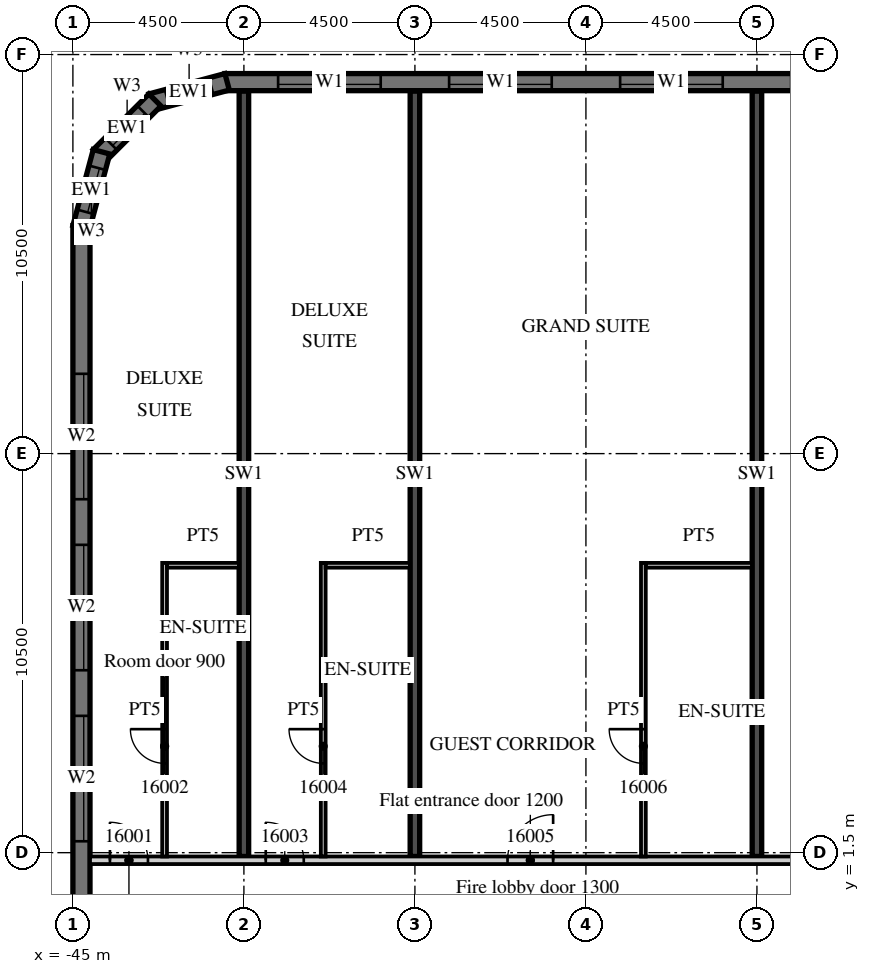
"""IFC4 building model, lengths in metres.
Left out: names, types, materials, properties, quantities, classifications, styles, units other than length and angle.
Written with IfcOpenShell. Run it as: python <this file> out.ifc"""

import sys

from ifc_helpers import new_model, si_unit, direction, frame, frame_2d, origin, place, context, subcontext, project, spatial, polyline, rectangle, outline, extrude, element, fill, save


model = new_model("IFC4")
c1 = context("Model", 3, precision=1e-05, world=origin(), true_north=direction((0.0, 1.0)))
c2 = subcontext(c1, "Body", "Model", "MODEL_VIEW")
j1 = project(units=[si_unit("LENGTHUNIT", "METRE"), si_unit("PLANEANGLEUNIT", "RADIAN")], contexts=[c1])
p1 = place(None, origin())
s1 = spatial("IfcSite", under=j1, at=p1, CompositionType="ELEMENT")
p2 = place(p1, origin())
s2 = spatial("IfcBuilding", under=s1, at=p2, CompositionType="ELEMENT")
p3 = place(p2, frame((0.0, 0.0, 83.1)))
s3 = spatial("IfcBuildingStorey", under=s2, at=p3, CompositionType="ELEMENT", Elevation=83.1)
for number, where, z_axis, x_axis in (
    (1, (-40.5, 1.4, 0.0), (0.0, 0.0, 1.0), (0.0, 1.0, 0.0)),
    (2, (-36.0, 1.4, 0.0), (0.0, 0.0, 1.0), (0.0, 1.0, 0.0)),
    (3, (-27.0, 1.4, 0.0), (0.0, 0.0, 1.0), (0.0, 1.0, 0.0)),
):
    element("IfcWall", number, at=place(p3, frame(where, z_axis=z_axis, x_axis=x_axis)), inside=s3, PredefinedType="SHEAR", context=c2, shape_type="SweptSolid", body=[
        extrude(rectangle(XDim=20.14, YDim=0.25, at=frame_2d((10.07, 0.0))), origin(), (0.0, 0.0, 1.0), 3.3),
    ])
p4 = place(p3, frame((13.5, 21.775, 0.0), z_axis=(0.0, 0.0, 1.0), x_axis=(-1.0, 0.0, 0.0)))
e4 = element("IfcWall", 4, at=p4, inside=s3, PredefinedType="SOLIDWALL", context=c2, shape_type="SweptSolid", body=[
    extrude(rectangle(XDim=54.5, YDim=0.45, at=frame_2d((27.25, 0.0))), origin(), (0.0, 0.0, 1.0), 3.02),
])
p5 = place(p4, frame((0.9, 0.0, 0.45)))
e5 = element("IfcOpeningElement", 5, at=p5, cuts=e4, PredefinedType="OPENING", context=c2, shape_type="SweptSolid", body=[
    extrude(rectangle(XDim=2.7, YDim=2.25, at=frame_2d((1.35, 1.125))), frame((0.0, 0.235, 0.0), z_axis=(0.0, -1.0, 0.0), x_axis=(1.0, 0.0, 0.0)), (0.0, 0.0, 1.0), 0.47),
])
p6 = place(p4, frame((5.4, 0.0, 0.45)))
e6 = element("IfcOpeningElement", 6, at=p6, cuts=e4, PredefinedType="OPENING", context=c2, shape_type="SweptSolid", body=[
    extrude(rectangle(XDim=2.7, YDim=2.25, at=frame_2d((1.35, 1.125))), frame((0.0, 0.235, 0.0), z_axis=(0.0, -1.0, 0.0), x_axis=(1.0, 0.0, 0.0)), (0.0, 0.0, 1.0), 0.47),
])
p7 = place(p4, frame((9.9, 0.0, 0.45)))
e7 = element("IfcOpeningElement", 7, at=p7, cuts=e4, PredefinedType="OPENING", context=c2, shape_type="SweptSolid", body=[
    extrude(rectangle(XDim=2.7, YDim=2.25, at=frame_2d((1.35, 1.125))), frame((0.0, 0.235, 0.0), z_axis=(0.0, -1.0, 0.0), x_axis=(1.0, 0.0, 0.0)), (0.0, 0.0, 1.0), 0.47),
])
p8 = place(p4, frame((14.4, 0.0, 0.45)))
e8 = element("IfcOpeningElement", 8, at=p8, cuts=e4, PredefinedType="OPENING", context=c2, shape_type="SweptSolid", body=[
    extrude(rectangle(XDim=2.7, YDim=2.25, at=frame_2d((1.35, 1.125))), frame((0.0, 0.235, 0.0), z_axis=(0.0, -1.0, 0.0), x_axis=(1.0, 0.0, 0.0)), (0.0, 0.0, 1.0), 0.47),
])
p9 = place(p4, frame((18.9, 0.0, 0.45)))
e9 = element("IfcOpeningElement", 9, at=p9, cuts=e4, PredefinedType="OPENING", context=c2, shape_type="SweptSolid", body=[
    extrude(rectangle(XDim=2.7, YDim=2.25, at=frame_2d((1.35, 1.125))), frame((0.0, 0.235, 0.0), z_axis=(0.0, -1.0, 0.0), x_axis=(1.0, 0.0, 0.0)), (0.0, 0.0, 1.0), 0.47),
])
p10 = place(p4, frame((23.4, 0.0, 0.45)))
e10 = element("IfcOpeningElement", 10, at=p10, cuts=e4, PredefinedType="OPENING", context=c2, shape_type="SweptSolid", body=[
    extrude(rectangle(XDim=2.7, YDim=2.25, at=frame_2d((1.35, 1.125))), frame((0.0, 0.235, 0.0), z_axis=(0.0, -1.0, 0.0), x_axis=(1.0, 0.0, 0.0)), (0.0, 0.0, 1.0), 0.47),
])
p11 = place(p4, frame((27.9, 0.0, 0.45)))
e11 = element("IfcOpeningElement", 11, at=p11, cuts=e4, PredefinedType="OPENING", context=c2, shape_type="SweptSolid", body=[
    extrude(rectangle(XDim=2.7, YDim=2.25, at=frame_2d((1.35, 1.125))), frame((0.0, 0.235, 0.0), z_axis=(0.0, -1.0, 0.0), x_axis=(1.0, 0.0, 0.0)), (0.0, 0.0, 1.0), 0.47),
])
p12 = place(p4, frame((32.4, 0.0, 0.45)))
e12 = element("IfcOpeningElement", 12, at=p12, cuts=e4, PredefinedType="OPENING", context=c2, shape_type="SweptSolid", body=[
    extrude(rectangle(XDim=2.7, YDim=2.25, at=frame_2d((1.35, 1.125))), frame((0.0, 0.235, 0.0), z_axis=(0.0, -1.0, 0.0), x_axis=(1.0, 0.0, 0.0)), (0.0, 0.0, 1.0), 0.47),
])
p13 = place(p4, frame((36.9, 0.0, 0.45)))
e13 = element("IfcOpeningElement", 13, at=p13, cuts=e4, PredefinedType="OPENING", context=c2, shape_type="SweptSolid", body=[
    extrude(rectangle(XDim=2.7, YDim=2.25, at=frame_2d((1.35, 1.125))), frame((0.0, 0.235, 0.0), z_axis=(0.0, -1.0, 0.0), x_axis=(1.0, 0.0, 0.0)), (0.0, 0.0, 1.0), 0.47),
])
p14 = place(p4, frame((41.4, 0.0, 0.45)))
e14 = element("IfcOpeningElement", 14, at=p14, cuts=e4, PredefinedType="OPENING", context=c2, shape_type="SweptSolid", body=[
    extrude(rectangle(XDim=2.7, YDim=2.25, at=frame_2d((1.35, 1.125))), frame((0.0, 0.235, 0.0), z_axis=(0.0, -1.0, 0.0), x_axis=(1.0, 0.0, 0.0)), (0.0, 0.0, 1.0), 0.47),
])
p15 = place(p4, frame((45.9, 0.0, 0.45)))
e15 = element("IfcOpeningElement", 15, at=p15, cuts=e4, PredefinedType="OPENING", context=c2, shape_type="SweptSolid", body=[
    extrude(rectangle(XDim=2.7, YDim=2.25, at=frame_2d((1.35, 1.125))), frame((0.0, 0.235, 0.0), z_axis=(0.0, -1.0, 0.0), x_axis=(1.0, 0.0, 0.0)), (0.0, 0.0, 1.0), 0.47),
])
p16 = place(p4, frame((50.4, 0.0, 0.45)))
e16 = element("IfcOpeningElement", 16, at=p16, cuts=e4, PredefinedType="OPENING", context=c2, shape_type="SweptSolid", body=[
    extrude(rectangle(XDim=2.7, YDim=2.25, at=frame_2d((1.35, 1.125))), frame((0.0, 0.235, 0.0), z_axis=(0.0, -1.0, 0.0), x_axis=(1.0, 0.0, 0.0)), (0.0, 0.0, 1.0), 0.47),
])
p17 = place(p3, frame((-40.942, 21.783, 0.0), z_axis=(0.0, 0.0, 1.0), x_axis=(-0.965926999034, -0.25881466832, 0.0)))
e17 = element("IfcWall", 17, at=p17, inside=s3, PredefinedType="SOLIDWALL", context=c2, shape_type="SweptSolid", body=[
    extrude(outline(polyline([(0.0, -0.225), (2.071, -0.225), (1.95, 0.225), (0.121, 0.225), (0.0, -0.225)])), origin(), (0.0, 0.0, 1.0), 3.02),
])
p18 = place(p17, frame((0.435, 0.0, 0.45)))
e18 = element("IfcOpeningElement", 18, at=p18, cuts=e17, PredefinedType="OPENING", context=c2, shape_type="SweptSolid", body=[
    extrude(rectangle(XDim=1.2, YDim=2.25, at=frame_2d((0.6, 1.125))), frame((0.0, 0.235, 0.0), z_axis=(0.0, -1.0, 0.0), x_axis=(1.0, 0.0, 0.0)), (0.0, 0.0, 1.0), 0.47),
])
p19 = place(p3, frame((-42.841, 21.305, 0.0), z_axis=(0.0, 0.0, 1.0), x_axis=(-0.707106781187, -0.707106781187, 0.0)))
e19 = element("IfcWall", 19, at=p19, inside=s3, PredefinedType="SOLIDWALL", context=c2, shape_type="SweptSolid", body=[
    extrude(outline(polyline([(0.0, -0.225), (2.071, -0.225), (1.95, 0.225), (0.121, 0.225), (0.0, -0.225)])), origin(), (0.0, 0.0, 1.0), 3.02),
])
p20 = place(p19, frame((0.435, 0.0, 0.45)))
e20 = element("IfcOpeningElement", 20, at=p20, cuts=e19, PredefinedType="OPENING", context=c2, shape_type="SweptSolid", body=[
    extrude(rectangle(XDim=1.2, YDim=2.25, at=frame_2d((0.6, 1.125))), frame((0.0, 0.235, 0.0), z_axis=(0.0, -1.0, 0.0), x_axis=(1.0, 0.0, 0.0)), (0.0, 0.0, 1.0), 0.47),
])
p21 = place(p3, frame((-44.247, 19.942, 0.0), z_axis=(0.0, 0.0, 1.0), x_axis=(-0.25881466832, -0.965926999034, 0.0)))
e21 = element("IfcWall", 21, at=p21, inside=s3, PredefinedType="SOLIDWALL", context=c2, shape_type="SweptSolid", body=[
    extrude(outline(polyline([(-0.0, -0.225), (2.07, -0.225), (1.95, 0.225), (0.12, 0.225), (-0.0, -0.225)])), origin(), (0.0, 0.0, 1.0), 3.02),
])
p22 = place(p21, frame((0.435, 0.0, 0.45)))
e22 = element("IfcOpeningElement", 22, at=p22, cuts=e21, PredefinedType="OPENING", context=c2, shape_type="SweptSolid", body=[
    extrude(rectangle(XDim=1.2, YDim=2.25, at=frame_2d((0.6, 1.125))), frame((0.0, 0.235, 0.0), z_axis=(0.0, -1.0, 0.0), x_axis=(1.0, 0.0, 0.0)), (0.0, 0.0, 1.0), 0.47),
])
p23 = place(p3, frame((-44.775, 18.0, 0.0), z_axis=(0.0, 0.0, 1.0), x_axis=(0.0, -1.0, 0.0)))
e23 = element("IfcWall", 23, at=p23, inside=s3, PredefinedType="SOLIDWALL", context=c2, shape_type="SweptSolid", body=[
    extrude(rectangle(XDim=36.0, YDim=0.45, at=frame_2d((18.0, 0.0))), origin(), (0.0, 0.0, 1.0), 3.02),
])
p24 = place(p23, frame((3.9, 0.0, 0.45)))
e24 = element("IfcOpeningElement", 24, at=p24, cuts=e23, PredefinedType="OPENING", context=c2, shape_type="SweptSolid", body=[
    extrude(rectangle(XDim=3.3, YDim=2.25, at=frame_2d((1.65, 1.125))), frame((0.0, 0.235, 0.0), z_axis=(0.0, -1.0, 0.0), x_axis=(1.0, 0.0, 0.0)), (0.0, 0.0, 1.0), 0.47),
])
p25 = place(p23, frame((8.4, 0.0, 0.45)))
e25 = element("IfcOpeningElement", 25, at=p25, cuts=e23, PredefinedType="OPENING", context=c2, shape_type="SweptSolid", body=[
    extrude(rectangle(XDim=3.3, YDim=2.25, at=frame_2d((1.65, 1.125))), frame((0.0, 0.235, 0.0), z_axis=(0.0, -1.0, 0.0), x_axis=(1.0, 0.0, 0.0)), (0.0, 0.0, 1.0), 0.47),
])
p26 = place(p23, frame((12.9, 0.0, 0.45)))
e26 = element("IfcOpeningElement", 26, at=p26, cuts=e23, PredefinedType="OPENING", context=c2, shape_type="SweptSolid", body=[
    extrude(rectangle(XDim=3.3, YDim=2.25, at=frame_2d((1.65, 1.125))), frame((0.0, 0.235, 0.0), z_axis=(0.0, -1.0, 0.0), x_axis=(1.0, 0.0, 0.0)), (0.0, 0.0, 1.0), 0.47),
])
p27 = place(p3, frame((-44.55, 1.3, 0.0), z_axis=(0.0, 0.0, 1.0), x_axis=(1.0, 0.0, 0.0)))
e27 = element("IfcWall", 27, at=p27, inside=s3, PredefinedType="PARTITIONING", context=c2, shape_type="SweptSolid", body=[
    extrude(rectangle(XDim=58.05, YDim=0.2, at=frame_2d((29.025, 0.0))), origin(), (0.0, 0.0, 1.0), 3.02),
])
p28 = place(p27, frame((0.525, 0.0, 0.0)))
e28 = element("IfcOpeningElement", 28, at=p28, cuts=e27, PredefinedType="OPENING", context=c2, shape_type="SweptSolid", body=[
    extrude(rectangle(XDim=1.0, YDim=2.1, at=frame_2d((0.5, 1.05))), frame((0.0, 0.11, 0.0), z_axis=(0.0, -1.0, 0.0), x_axis=(1.0, 0.0, 0.0)), (0.0, 0.0, 1.0), 0.22),
])
p29 = place(p27, frame((4.625, 0.0, 0.0)))
e29 = element("IfcOpeningElement", 29, at=p29, cuts=e27, PredefinedType="OPENING", context=c2, shape_type="SweptSolid", body=[
    extrude(rectangle(XDim=1.0, YDim=2.1, at=frame_2d((0.5, 1.05))), frame((0.0, 0.11, 0.0), z_axis=(0.0, -1.0, 0.0), x_axis=(1.0, 0.0, 0.0)), (0.0, 0.0, 1.0), 0.22),
])
p30 = place(p27, frame((10.987, 0.0, 0.0)))
e30 = element("IfcOpeningElement", 30, at=p30, cuts=e27, PredefinedType="OPENING", context=c2, shape_type="SweptSolid", body=[
    extrude(rectangle(XDim=1.2, YDim=2.1, at=frame_2d((0.6, 1.05))), frame((0.0, 0.11, 0.0), z_axis=(0.0, -1.0, 0.0), x_axis=(1.0, 0.0, 0.0)), (0.0, 0.0, 1.0), 0.22),
])
p31 = place(p27, frame((19.987, 0.0, 0.0)))
e31 = element("IfcOpeningElement", 31, at=p31, cuts=e27, PredefinedType="OPENING", context=c2, shape_type="SweptSolid", body=[
    extrude(rectangle(XDim=1.2, YDim=2.1, at=frame_2d((0.6, 1.05))), frame((0.0, 0.11, 0.0), z_axis=(0.0, -1.0, 0.0), x_axis=(1.0, 0.0, 0.0)), (0.0, 0.0, 1.0), 0.22),
])
p32 = place(p27, frame((28.987, 0.0, 0.0)))
e32 = element("IfcOpeningElement", 32, at=p32, cuts=e27, PredefinedType="OPENING", context=c2, shape_type="SweptSolid", body=[
    extrude(rectangle(XDim=1.2, YDim=2.1, at=frame_2d((0.6, 1.05))), frame((0.0, 0.11, 0.0), z_axis=(0.0, -1.0, 0.0), x_axis=(1.0, 0.0, 0.0)), (0.0, 0.0, 1.0), 0.22),
])
p33 = place(p27, frame((36.125, 0.0, 0.0)))
e33 = element("IfcOpeningElement", 33, at=p33, cuts=e27, PredefinedType="OPENING", context=c2, shape_type="SweptSolid", body=[
    extrude(rectangle(XDim=1.0, YDim=2.1, at=frame_2d((0.5, 1.05))), frame((0.0, 0.11, 0.0), z_axis=(0.0, -1.0, 0.0), x_axis=(1.0, 0.0, 0.0)), (0.0, 0.0, 1.0), 0.22),
])
p34 = place(p27, frame((42.975, 0.0, 0.0)))
e34 = element("IfcOpeningElement", 34, at=p34, cuts=e27, PredefinedType="OPENING", context=c2, shape_type="SweptSolid", body=[
    extrude(rectangle(XDim=1.0, YDim=2.1, at=frame_2d((0.5, 1.05))), frame((0.0, 0.11, 0.0), z_axis=(0.0, -1.0, 0.0), x_axis=(1.0, 0.0, 0.0)), (0.0, 0.0, 1.0), 0.22),
])
p35 = place(p27, frame((46.987, 0.0, 0.0)))
e35 = element("IfcOpeningElement", 35, at=p35, cuts=e27, PredefinedType="OPENING", context=c2, shape_type="SweptSolid", body=[
    extrude(rectangle(XDim=1.2, YDim=2.1, at=frame_2d((0.6, 1.05))), frame((0.0, 0.11, 0.0), z_axis=(0.0, -1.0, 0.0), x_axis=(1.0, 0.0, 0.0)), (0.0, 0.0, 1.0), 0.22),
])
p36 = place(p27, frame((56.475, 0.0, 0.0)))
e36 = element("IfcOpeningElement", 36, at=p36, cuts=e27, PredefinedType="OPENING", context=c2, shape_type="SweptSolid", body=[
    extrude(rectangle(XDim=1.0, YDim=2.1, at=frame_2d((0.5, 1.05))), frame((0.0, 0.11, 0.0), z_axis=(0.0, -1.0, 0.0), x_axis=(1.0, 0.0, 0.0)), (0.0, 0.0, 1.0), 0.22),
])
p37 = place(p3, frame((-42.587, 1.4, 0.0), z_axis=(0.0, 0.0, 1.0), x_axis=(0.0, 1.0, 0.0)))
e37 = element("IfcWall", 37, at=p37, inside=s3, PredefinedType="PARTITIONING", context=c2, shape_type="SweptSolid", body=[
    extrude(rectangle(XDim=7.725, YDim=0.125, at=frame_2d((3.863, 0.0))), origin(), (0.0, 0.0, 1.0), 3.02),
])
p38 = place(p37, frame((2.45, 0.0, 0.0)))
e38 = element("IfcOpeningElement", 38, at=p38, cuts=e37, PredefinedType="OPENING", context=c2, shape_type="SweptSolid", body=[
    extrude(rectangle(XDim=0.9, YDim=2.1, at=frame_2d((0.45, 1.05))), frame((0.0, 0.073, 0.0), z_axis=(0.0, -1.0, 0.0), x_axis=(1.0, 0.0, 0.0)), (0.0, 0.0, 1.0), 0.145),
])
p39 = place(p3, frame((-42.525, 9.062, 0.0), z_axis=(0.0, 0.0, 1.0), x_axis=(1.0, 0.0, 0.0)))
e39 = element("IfcWall", 39, at=p39, inside=s3, PredefinedType="PARTITIONING", context=c2, shape_type="SweptSolid", body=[
    extrude(rectangle(XDim=1.9, YDim=0.125, at=frame_2d((0.95, 0.0))), origin(), (0.0, 0.0, 1.0), 3.02),
])
p40 = place(p3, frame((-38.413, 1.4, 0.0), z_axis=(0.0, 0.0, 1.0), x_axis=(0.0, 1.0, 0.0)))
e40 = element("IfcWall", 40, at=p40, inside=s3, PredefinedType="PARTITIONING", context=c2, shape_type="SweptSolid", body=[
    extrude(rectangle(XDim=7.725, YDim=0.125, at=frame_2d((3.863, 0.0))), origin(), (0.0, 0.0, 1.0), 3.02),
])
p41 = place(p40, frame((2.45, 0.0, 0.0)))
e41 = element("IfcOpeningElement", 41, at=p41, cuts=e40, PredefinedType="OPENING", context=c2, shape_type="SweptSolid", body=[
    extrude(rectangle(XDim=0.9, YDim=2.1, at=frame_2d((0.45, 1.05))), frame((0.0, 0.073, 0.0), z_axis=(0.0, -1.0, 0.0), x_axis=(1.0, 0.0, 0.0)), (0.0, 0.0, 1.0), 0.145),
])
p42 = place(p3, frame((-38.35, 9.062, 0.0), z_axis=(0.0, 0.0, 1.0), x_axis=(1.0, 0.0, 0.0)))
e42 = element("IfcWall", 42, at=p42, inside=s3, PredefinedType="PARTITIONING", context=c2, shape_type="SweptSolid", body=[
    extrude(rectangle(XDim=2.225, YDim=0.125, at=frame_2d((1.113, 0.0))), origin(), (0.0, 0.0, 1.0), 3.02),
])
p43 = place(p3, frame((-29.988, 1.4, 0.0), z_axis=(0.0, 0.0, 1.0), x_axis=(0.0, 1.0, 0.0)))
e43 = element("IfcWall", 43, at=p43, inside=s3, PredefinedType="PARTITIONING", context=c2, shape_type="SweptSolid", body=[
    extrude(rectangle(XDim=7.725, YDim=0.125, at=frame_2d((3.863, 0.0))), origin(), (0.0, 0.0, 1.0), 3.02),
])
p44 = place(p43, frame((2.45, 0.0, 0.0)))
e44 = element("IfcOpeningElement", 44, at=p44, cuts=e43, PredefinedType="OPENING", context=c2, shape_type="SweptSolid", body=[
    extrude(rectangle(XDim=0.9, YDim=2.1, at=frame_2d((0.45, 1.05))), frame((0.0, 0.073, 0.0), z_axis=(0.0, -1.0, 0.0), x_axis=(1.0, 0.0, 0.0)), (0.0, 0.0, 1.0), 0.145),
])
p45 = place(p3, frame((-29.925, 9.062, 0.0), z_axis=(0.0, 0.0, 1.0), x_axis=(1.0, 0.0, 0.0)))
e45 = element("IfcWall", 45, at=p45, inside=s3, PredefinedType="PARTITIONING", context=c2, shape_type="SweptSolid", body=[
    extrude(rectangle(XDim=2.8, YDim=0.125, at=frame_2d((1.4, 0.0))), origin(), (0.0, 0.0, 1.0), 3.02),
])
p46 = place(p14, origin())
e46 = element("IfcWindow", 46, at=p46, inside=s3, PartitioningType="SINGLE_PANEL", PredefinedType="WINDOW", context=c2, shape_type="SweptSolid", body=[
    extrude(rectangle(XDim=2.7, YDim=2.25, at=frame_2d((1.35, 1.125))), frame((0.0, 0.09, 0.0), z_axis=(0.0, -1.0, 0.0), x_axis=(1.0, 0.0, 0.0)), (0.0, 0.0, 1.0), 0.06),
])
fill(e14, e46)
p47 = place(p15, origin())
e47 = element("IfcWindow", 47, at=p47, inside=s3, PartitioningType="SINGLE_PANEL", PredefinedType="WINDOW", context=c2, shape_type="SweptSolid", body=[
    extrude(rectangle(XDim=2.7, YDim=2.25, at=frame_2d((1.35, 1.125))), frame((0.0, 0.09, 0.0), z_axis=(0.0, -1.0, 0.0), x_axis=(1.0, 0.0, 0.0)), (0.0, 0.0, 1.0), 0.06),
])
fill(e15, e47)
p48 = place(p16, origin())
e48 = element("IfcWindow", 48, at=p48, inside=s3, PartitioningType="SINGLE_PANEL", PredefinedType="WINDOW", context=c2, shape_type="SweptSolid", body=[
    extrude(rectangle(XDim=2.7, YDim=2.25, at=frame_2d((1.35, 1.125))), frame((0.0, 0.09, 0.0), z_axis=(0.0, -1.0, 0.0), x_axis=(1.0, 0.0, 0.0)), (0.0, 0.0, 1.0), 0.06),
])
fill(e16, e48)
p49 = place(p18, origin())
e49 = element("IfcWindow", 49, at=p49, inside=s3, PartitioningType="SINGLE_PANEL", PredefinedType="WINDOW", context=c2, shape_type="SweptSolid", body=[
    extrude(rectangle(XDim=1.2, YDim=2.25, at=frame_2d((0.6, 1.125))), frame((0.0, 0.09, 0.0), z_axis=(0.0, -1.0, 0.0), x_axis=(1.0, 0.0, 0.0)), (0.0, 0.0, 1.0), 0.06),
])
fill(e18, e49)
p50 = place(p20, origin())
e50 = element("IfcWindow", 50, at=p50, inside=s3, PartitioningType="SINGLE_PANEL", PredefinedType="WINDOW", context=c2, shape_type="SweptSolid", body=[
    extrude(rectangle(XDim=1.2, YDim=2.25, at=frame_2d((0.6, 1.125))), frame((0.0, 0.09, 0.0), z_axis=(0.0, -1.0, 0.0), x_axis=(1.0, 0.0, 0.0)), (0.0, 0.0, 1.0), 0.06),
])
fill(e20, e50)
p51 = place(p22, origin())
e51 = element("IfcWindow", 51, at=p51, inside=s3, PartitioningType="SINGLE_PANEL", PredefinedType="WINDOW", context=c2, shape_type="SweptSolid", body=[
    extrude(rectangle(XDim=1.2, YDim=2.25, at=frame_2d((0.6, 1.125))), frame((0.0, 0.09, 0.0), z_axis=(0.0, -1.0, 0.0), x_axis=(1.0, 0.0, 0.0)), (0.0, 0.0, 1.0), 0.06),
])
fill(e22, e51)
p52 = place(p24, origin())
e52 = element("IfcWindow", 52, at=p52, inside=s3, PartitioningType="SINGLE_PANEL", PredefinedType="WINDOW", context=c2, shape_type="SweptSolid", body=[
    extrude(rectangle(XDim=3.3, YDim=2.25, at=frame_2d((1.65, 1.125))), frame((0.0, 0.09, 0.0), z_axis=(0.0, -1.0, 0.0), x_axis=(1.0, 0.0, 0.0)), (0.0, 0.0, 1.0), 0.06),
])
fill(e24, e52)
p53 = place(p25, origin())
e53 = element("IfcWindow", 53, at=p53, inside=s3, PartitioningType="SINGLE_PANEL", PredefinedType="WINDOW", context=c2, shape_type="SweptSolid", body=[
    extrude(rectangle(XDim=3.3, YDim=2.25, at=frame_2d((1.65, 1.125))), frame((0.0, 0.09, 0.0), z_axis=(0.0, -1.0, 0.0), x_axis=(1.0, 0.0, 0.0)), (0.0, 0.0, 1.0), 0.06),
])
fill(e25, e53)
p54 = place(p26, origin())
e54 = element("IfcWindow", 54, at=p54, inside=s3, PartitioningType="SINGLE_PANEL", PredefinedType="WINDOW", context=c2, shape_type="SweptSolid", body=[
    extrude(rectangle(XDim=3.3, YDim=2.25, at=frame_2d((1.65, 1.125))), frame((0.0, 0.09, 0.0), z_axis=(0.0, -1.0, 0.0), x_axis=(1.0, 0.0, 0.0)), (0.0, 0.0, 1.0), 0.06),
])
fill(e26, e54)
p55 = place(p28, origin())
e55 = element("IfcDoor", 55, at=p55, inside=s3, OperationType="SINGLE_SWING_LEFT", PredefinedType="DOOR", context=c2, shape_type="SweptSolid", body=[
    extrude(rectangle(XDim=1.0, YDim=2.1, at=frame_2d((0.5, 1.05))), frame((0.0, 0.025, 0.0), z_axis=(0.0, -1.0, 0.0), x_axis=(1.0, 0.0, 0.0)), (0.0, 0.0, 1.0), 0.05),
])
fill(e28, e55)
p56 = place(p38, origin())
e56 = element("IfcDoor", 56, at=p56, inside=s3, OperationType="SINGLE_SWING_RIGHT", PredefinedType="DOOR", context=c2, shape_type="SweptSolid", body=[
    extrude(rectangle(XDim=0.9, YDim=2.1, at=frame_2d((0.45, 1.05))), frame((0.0, 0.025, 0.0), z_axis=(0.0, -1.0, 0.0), x_axis=(1.0, 0.0, 0.0)), (0.0, 0.0, 1.0), 0.05),
])
fill(e38, e56)
p57 = place(p29, origin())
e57 = element("IfcDoor", 57, at=p57, inside=s3, OperationType="SINGLE_SWING_LEFT", PredefinedType="DOOR", context=c2, shape_type="SweptSolid", body=[
    extrude(rectangle(XDim=1.0, YDim=2.1, at=frame_2d((0.5, 1.05))), frame((0.0, 0.025, 0.0), z_axis=(0.0, -1.0, 0.0), x_axis=(1.0, 0.0, 0.0)), (0.0, 0.0, 1.0), 0.05),
])
fill(e29, e57)
p58 = place(p41, origin())
e58 = element("IfcDoor", 58, at=p58, inside=s3, OperationType="SINGLE_SWING_RIGHT", PredefinedType="DOOR", context=c2, shape_type="SweptSolid", body=[
    extrude(rectangle(XDim=0.9, YDim=2.1, at=frame_2d((0.45, 1.05))), frame((0.0, 0.025, 0.0), z_axis=(0.0, -1.0, 0.0), x_axis=(1.0, 0.0, 0.0)), (0.0, 0.0, 1.0), 0.05),
])
fill(e41, e58)
p59 = place(p30, origin())
e59 = element("IfcDoor", 59, at=p59, inside=s3, OperationType="SINGLE_SWING_RIGHT", PredefinedType="DOOR", context=c2, shape_type="SweptSolid", body=[
    extrude(rectangle(XDim=1.2, YDim=2.1, at=frame_2d((0.6, 1.05))), frame((0.0, 0.025, 0.0), z_axis=(0.0, -1.0, 0.0), x_axis=(1.0, 0.0, 0.0)), (0.0, 0.0, 1.0), 0.05),
])
fill(e30, e59)
p60 = place(p44, origin())
e60 = element("IfcDoor", 60, at=p60, inside=s3, OperationType="SINGLE_SWING_RIGHT", PredefinedType="DOOR", context=c2, shape_type="SweptSolid", body=[
    extrude(rectangle(XDim=0.9, YDim=2.1, at=frame_2d((0.45, 1.05))), frame((0.0, 0.025, 0.0), z_axis=(0.0, -1.0, 0.0), x_axis=(1.0, 0.0, 0.0)), (0.0, 0.0, 1.0), 0.05),
])
fill(e44, e60)
save(model, sys.argv[1])
